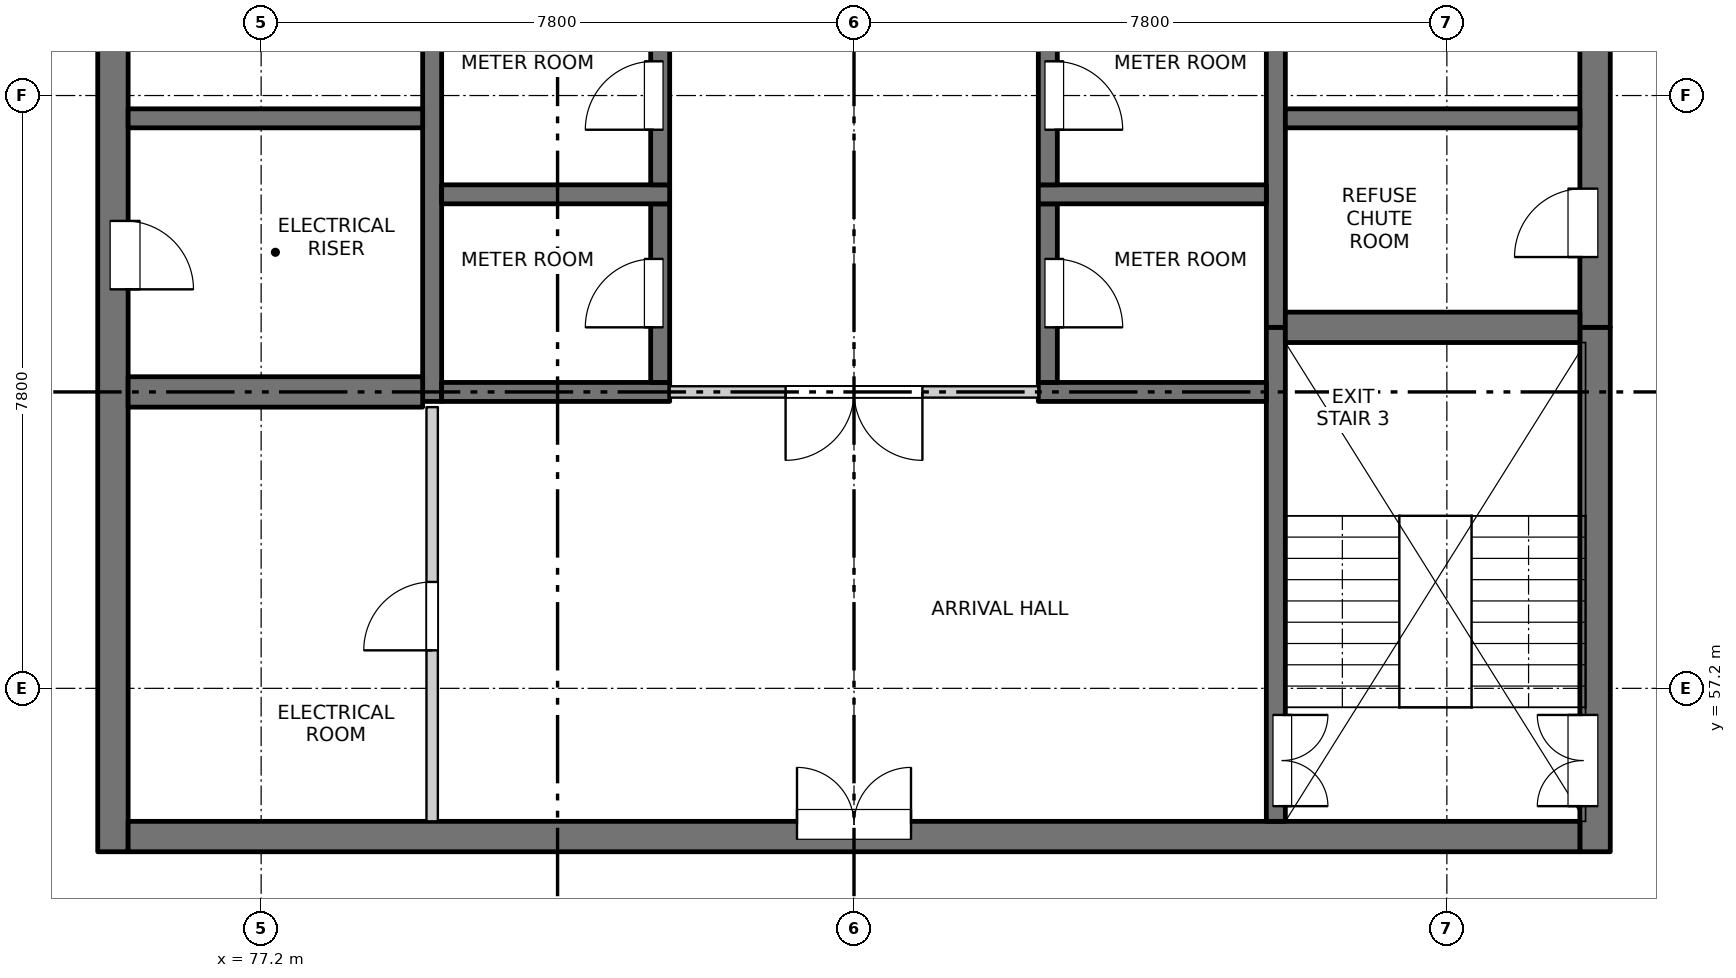
"""IFC4 building model, lengths in metres.
Left out: names, types, materials, properties, quantities, classifications, styles, units other than length and angle.
Written with IfcOpenShell. Run it as: python <this file> out.ifc"""

import sys

from ifc_helpers import new_model, si_unit, direction, frame, frame_2d, origin, place, context, subcontext, project, spatial, rectangle, extrude, element, fill, save


model = new_model("IFC4")
c1 = context("Model", 3, precision=1e-05, world=origin(), true_north=direction((0.0, 1.0)))
c2 = subcontext(c1, "Body", "Model", "MODEL_VIEW")
j1 = project(units=[si_unit("LENGTHUNIT", "METRE"), si_unit("PLANEANGLEUNIT", "RADIAN")], contexts=[c1])
p1 = place(None, origin())
s1 = spatial("IfcSite", under=j1, at=p1, CompositionType="ELEMENT")
p2 = place(p1, origin())
s2 = spatial("IfcBuilding", under=s1, at=p2, CompositionType="ELEMENT")
p3 = place(p2, frame((0.0, 0.0, 256.2)))
s3 = spatial("IfcBuildingStorey", under=s2, at=p3, CompositionType="ELEMENT", Elevation=256.2)
p4 = place(p3, frame((75.25, 55.05, -0.25), z_axis=(0.0, 0.0, 1.0), x_axis=(0.0, 1.0, 0.0)))
e1 = element("IfcWall", 1, at=p4, inside=s3, PredefinedType="SOLIDWALL", context=c2, shape_type="SweptSolid", body=[
    extrude(rectangle(XDim=22.25, YDim=0.4, at=frame_2d((11.125, 0.0))), origin(), (0.0, 0.0, 1.0), 3.4),
])
p5 = place(p4, frame((7.4, 0.0, 0.25)))
e2 = element("IfcOpeningElement", 2, at=p5, cuts=e1, PredefinedType="OPENING", context=c2, shape_type="SweptSolid", body=[
    extrude(rectangle(XDim=0.9, YDim=2.1, at=frame_2d((0.45, 1.05))), frame((0.0, 0.21, 0.0), z_axis=(0.0, -1.0, 0.0), x_axis=(1.0, 0.0, 0.0)), (0.0, 0.0, 1.0), 0.42),
])
p6 = place(p4, frame((10.7, 0.0, 0.25)))
e3 = element("IfcOpeningElement", 3, at=p6, cuts=e1, PredefinedType="OPENING", context=c2, shape_type="SweptSolid", body=[
    extrude(rectangle(XDim=0.9, YDim=2.1, at=frame_2d((0.45, 1.05))), frame((0.0, 0.21, 0.0), z_axis=(0.0, -1.0, 0.0), x_axis=(1.0, 0.0, 0.0)), (0.0, 0.0, 1.0), 0.42),
])
p7 = place(p4, frame((13.7, 0.0, 0.25)))
e4 = element("IfcOpeningElement", 4, at=p7, cuts=e1, PredefinedType="OPENING", context=c2, shape_type="SweptSolid", body=[
    extrude(rectangle(XDim=0.9, YDim=2.1, at=frame_2d((0.45, 1.05))), frame((0.0, 0.21, 0.0), z_axis=(0.0, -1.0, 0.0), x_axis=(1.0, 0.0, 0.0)), (0.0, 0.0, 1.0), 0.42),
])
p8 = place(p4, frame((16.7, 0.0, 0.25)))
e5 = element("IfcOpeningElement", 5, at=p8, cuts=e1, PredefinedType="OPENING", context=c2, shape_type="SweptSolid", body=[
    extrude(rectangle(XDim=0.9, YDim=2.1, at=frame_2d((0.45, 1.05))), frame((0.0, 0.21, 0.0), z_axis=(0.0, -1.0, 0.0), x_axis=(1.0, 0.0, 0.0)), (0.0, 0.0, 1.0), 0.42),
])
p9 = place(p4, frame((20.0, 0.0, 0.25)))
e6 = element("IfcOpeningElement", 6, at=p9, cuts=e1, PredefinedType="OPENING", context=c2, shape_type="SweptSolid", body=[
    extrude(rectangle(XDim=0.9, YDim=2.1, at=frame_2d((0.45, 1.05))), frame((0.0, 0.21, 0.0), z_axis=(0.0, -1.0, 0.0), x_axis=(1.0, 0.0, 0.0)), (0.0, 0.0, 1.0), 0.42),
])
p10 = place(p3, frame((94.75, 55.05, -0.25), z_axis=(0.0, 0.0, 1.0), x_axis=(0.0, 1.0, 0.0)))
e7 = element("IfcWall", 7, at=p10, inside=s3, PredefinedType="SOLIDWALL", context=c2, shape_type="SweptSolid", body=[
    extrude(rectangle(XDim=6.9, YDim=0.4, at=frame_2d((3.45, 0.0))), origin(), (0.0, 0.0, 1.0), 3.4),
])
p11 = place(p10, frame((0.6, 0.0, 0.25)))
e8 = element("IfcOpeningElement", 8, at=p11, cuts=e7, PredefinedType="OPENING", context=c2, shape_type="SweptSolid", body=[
    extrude(rectangle(XDim=1.2, YDim=2.1, at=frame_2d((0.6, 1.05))), frame((0.0, 0.21, 0.0), z_axis=(0.0, -1.0, 0.0), x_axis=(1.0, 0.0, 0.0)), (0.0, 0.0, 1.0), 0.42),
])
p12 = place(p3, frame((94.75, 61.95, -0.25), z_axis=(0.0, 0.0, 1.0), x_axis=(0.0, 1.0, 0.0)))
e9 = element("IfcWall", 9, at=p12, inside=s3, PredefinedType="SOLIDWALL", context=c2, shape_type="SweptSolid", body=[
    extrude(rectangle(XDim=15.35, YDim=0.4, at=frame_2d((7.675, 0.0))), origin(), (0.0, 0.0, 1.0), 3.4),
])
p13 = place(p12, frame((0.925, 0.0, 0.25)))
e10 = element("IfcOpeningElement", 10, at=p13, cuts=e9, PredefinedType="OPENING", context=c2, shape_type="SweptSolid", body=[
    extrude(rectangle(XDim=0.9, YDim=2.1, at=frame_2d((0.45, 1.05))), frame((0.0, 0.21, 0.0), z_axis=(0.0, -1.0, 0.0), x_axis=(1.0, 0.0, 0.0)), (0.0, 0.0, 1.0), 0.42),
])
p14 = place(p12, frame((3.8, 0.0, 0.25)))
e11 = element("IfcOpeningElement", 11, at=p14, cuts=e9, PredefinedType="OPENING", context=c2, shape_type="SweptSolid", body=[
    extrude(rectangle(XDim=0.9, YDim=2.1, at=frame_2d((0.45, 1.05))), frame((0.0, 0.21, 0.0), z_axis=(0.0, -1.0, 0.0), x_axis=(1.0, 0.0, 0.0)), (0.0, 0.0, 1.0), 0.42),
])
p15 = place(p12, frame((6.8, 0.0, 0.25)))
e12 = element("IfcOpeningElement", 12, at=p15, cuts=e9, PredefinedType="OPENING", context=c2, shape_type="SweptSolid", body=[
    extrude(rectangle(XDim=0.9, YDim=2.1, at=frame_2d((0.45, 1.05))), frame((0.0, 0.21, 0.0), z_axis=(0.0, -1.0, 0.0), x_axis=(1.0, 0.0, 0.0)), (0.0, 0.0, 1.0), 0.42),
])
p16 = place(p12, frame((9.8, 0.0, 0.25)))
e13 = element("IfcOpeningElement", 13, at=p16, cuts=e9, PredefinedType="OPENING", context=c2, shape_type="SweptSolid", body=[
    extrude(rectangle(XDim=0.9, YDim=2.1, at=frame_2d((0.45, 1.05))), frame((0.0, 0.21, 0.0), z_axis=(0.0, -1.0, 0.0), x_axis=(1.0, 0.0, 0.0)), (0.0, 0.0, 1.0), 0.42),
])
p17 = place(p12, frame((13.1, 0.0, 0.25)))
e14 = element("IfcOpeningElement", 14, at=p17, cuts=e9, PredefinedType="OPENING", context=c2, shape_type="SweptSolid", body=[
    extrude(rectangle(XDim=0.9, YDim=2.1, at=frame_2d((0.45, 1.05))), frame((0.0, 0.21, 0.0), z_axis=(0.0, -1.0, 0.0), x_axis=(1.0, 0.0, 0.0)), (0.0, 0.0, 1.0), 0.42),
])
p18 = place(p3, frame((75.45, 55.25, -0.25), z_axis=(0.0, 0.0, 1.0), x_axis=(1.0, 0.0, 0.0)))
e15 = element("IfcWall", 15, at=p18, inside=s3, PredefinedType="SOLIDWALL", context=c2, shape_type="SweptSolid", body=[
    extrude(rectangle(XDim=19.1, YDim=0.4, at=frame_2d((9.55, 0.0))), origin(), (0.0, 0.0, 1.0), 3.4),
])
p19 = place(p18, frame((8.8, 0.0, 0.25)))
e16 = element("IfcOpeningElement", 16, at=p19, cuts=e15, PredefinedType="OPENING", context=c2, shape_type="SweptSolid", body=[
    extrude(rectangle(XDim=1.5, YDim=2.1, at=frame_2d((0.75, 1.05))), frame((0.0, 0.21, 0.0), z_axis=(0.0, -1.0, 0.0), x_axis=(1.0, 0.0, 0.0)), (0.0, 0.0, 1.0), 0.42),
])
p20 = place(p3, frame((79.45, 60.975, -0.25), z_axis=(0.0, 0.0, 1.0), x_axis=(0.0, 1.0, 0.0)))
e17 = element("IfcWall", 17, at=p20, inside=s3, PredefinedType="SOLIDWALL", context=c2, shape_type="SweptSolid", body=[
    extrude(rectangle(XDim=16.325, YDim=0.25, at=frame_2d((8.163, 0.0))), origin(), (0.0, 0.0, 1.0), 3.4),
])
p21 = place(p3, frame((90.55, 55.45, -0.25), z_axis=(0.0, 0.0, 1.0), x_axis=(0.0, 1.0, 0.0)))
e18 = element("IfcWall", 18, at=p21, inside=s3, PredefinedType="SOLIDWALL", context=c2, shape_type="SweptSolid", body=[
    extrude(rectangle(XDim=6.5, YDim=0.25, at=frame_2d((3.25, 0.0))), origin(), (0.0, 0.0, 1.0), 3.4),
])
p22 = place(p21, frame((0.2, 0.0, 0.25)))
e19 = element("IfcOpeningElement", 19, at=p22, cuts=e18, PredefinedType="OPENING", context=c2, shape_type="SweptSolid", body=[
    extrude(rectangle(XDim=1.2, YDim=2.1, at=frame_2d((0.6, 1.05))), frame((0.0, 0.135, 0.0), z_axis=(0.0, -1.0, 0.0), x_axis=(1.0, 0.0, 0.0)), (0.0, 0.0, 1.0), 0.27),
])
p23 = place(p3, frame((90.55, 61.95, -0.25), z_axis=(0.0, 0.0, 1.0), x_axis=(0.0, 1.0, 0.0)))
e20 = element("IfcWall", 20, at=p23, inside=s3, PredefinedType="SOLIDWALL", context=c2, shape_type="SweptSolid", body=[
    extrude(rectangle(XDim=15.35, YDim=0.25, at=frame_2d((7.675, 0.0))), origin(), (0.0, 0.0, 1.0), 3.4),
])
p24 = place(p3, frame((79.575, 61.1, -0.25), z_axis=(0.0, 0.0, 1.0), x_axis=(1.0, 0.0, 0.0)))
e21 = element("IfcWall", 21, at=p24, inside=s3, PredefinedType="SOLIDWALL", context=c2, shape_type="SweptSolid", body=[
    extrude(rectangle(XDim=3.0, YDim=0.25, at=frame_2d((1.5, 0.0))), origin(), (0.0, 0.0, 1.0), 3.4),
])
p25 = place(p3, frame((82.45, 61.225, -0.25), z_axis=(0.0, 0.0, 1.0), x_axis=(0.0, 1.0, 0.0)))
e22 = element("IfcWall", 22, at=p25, inside=s3, PredefinedType="SOLIDWALL", context=c2, shape_type="SweptSolid", body=[
    extrude(rectangle(XDim=2.35, YDim=0.25, at=frame_2d((1.175, 0.0))), origin(), (0.0, 0.0, 1.0), 3.4),
])
p26 = place(p25, frame((0.725, 0.0, 0.25)))
e23 = element("IfcOpeningElement", 23, at=p26, cuts=e22, PredefinedType="OPENING", context=c2, shape_type="SweptSolid", body=[
    extrude(rectangle(XDim=0.9, YDim=2.1, at=frame_2d((0.45, 1.05))), frame((0.0, 0.135, 0.0), z_axis=(0.0, -1.0, 0.0), x_axis=(1.0, 0.0, 0.0)), (0.0, 0.0, 1.0), 0.27),
])
p27 = place(p3, frame((79.575, 63.7, -0.25), z_axis=(0.0, 0.0, 1.0), x_axis=(1.0, 0.0, 0.0)))
e24 = element("IfcWall", 24, at=p27, inside=s3, PredefinedType="SOLIDWALL", context=c2, shape_type="SweptSolid", body=[
    extrude(rectangle(XDim=3.0, YDim=0.25, at=frame_2d((1.5, 0.0))), origin(), (0.0, 0.0, 1.0), 3.4),
])
p28 = place(p3, frame((82.45, 63.825, -0.25), z_axis=(0.0, 0.0, 1.0), x_axis=(0.0, 1.0, 0.0)))
e25 = element("IfcWall", 25, at=p28, inside=s3, PredefinedType="SOLIDWALL", context=c2, shape_type="SweptSolid", body=[
    extrude(rectangle(XDim=2.35, YDim=0.25, at=frame_2d((1.175, 0.0))), origin(), (0.0, 0.0, 1.0), 3.4),
])
p29 = place(p28, frame((0.725, 0.0, 0.25)))
e26 = element("IfcOpeningElement", 26, at=p29, cuts=e25, PredefinedType="OPENING", context=c2, shape_type="SweptSolid", body=[
    extrude(rectangle(XDim=0.9, YDim=2.1, at=frame_2d((0.45, 1.05))), frame((0.0, 0.135, 0.0), z_axis=(0.0, -1.0, 0.0), x_axis=(1.0, 0.0, 0.0)), (0.0, 0.0, 1.0), 0.27),
])
p30 = place(p3, frame((87.425, 61.1, -0.25), z_axis=(0.0, 0.0, 1.0), x_axis=(1.0, 0.0, 0.0)))
e27 = element("IfcWall", 27, at=p30, inside=s3, PredefinedType="SOLIDWALL", context=c2, shape_type="SweptSolid", body=[
    extrude(rectangle(XDim=3.0, YDim=0.25, at=frame_2d((1.5, 0.0))), origin(), (0.0, 0.0, 1.0), 3.4),
])
p31 = place(p3, frame((87.55, 61.225, -0.25), z_axis=(0.0, 0.0, 1.0), x_axis=(0.0, 1.0, 0.0)))
e28 = element("IfcWall", 28, at=p31, inside=s3, PredefinedType="SOLIDWALL", context=c2, shape_type="SweptSolid", body=[
    extrude(rectangle(XDim=2.35, YDim=0.25, at=frame_2d((1.175, 0.0))), origin(), (0.0, 0.0, 1.0), 3.4),
])
p32 = place(p31, frame((0.725, 0.0, 0.25)))
e29 = element("IfcOpeningElement", 29, at=p32, cuts=e28, PredefinedType="OPENING", context=c2, shape_type="SweptSolid", body=[
    extrude(rectangle(XDim=0.9, YDim=2.1, at=frame_2d((0.45, 1.05))), frame((0.0, 0.135, 0.0), z_axis=(0.0, -1.0, 0.0), x_axis=(1.0, 0.0, 0.0)), (0.0, 0.0, 1.0), 0.27),
])
p33 = place(p3, frame((87.425, 63.7, -0.25), z_axis=(0.0, 0.0, 1.0), x_axis=(1.0, 0.0, 0.0)))
e30 = element("IfcWall", 30, at=p33, inside=s3, PredefinedType="SOLIDWALL", context=c2, shape_type="SweptSolid", body=[
    extrude(rectangle(XDim=3.0, YDim=0.25, at=frame_2d((1.5, 0.0))), origin(), (0.0, 0.0, 1.0), 3.4),
])
p34 = place(p3, frame((87.55, 63.825, -0.25), z_axis=(0.0, 0.0, 1.0), x_axis=(0.0, 1.0, 0.0)))
e31 = element("IfcWall", 31, at=p34, inside=s3, PredefinedType="SOLIDWALL", context=c2, shape_type="SweptSolid", body=[
    extrude(rectangle(XDim=2.35, YDim=0.25, at=frame_2d((1.175, 0.0))), origin(), (0.0, 0.0, 1.0), 3.4),
])
p35 = place(p34, frame((0.725, 0.0, 0.25)))
e32 = element("IfcOpeningElement", 32, at=p35, cuts=e31, PredefinedType="OPENING", context=c2, shape_type="SweptSolid", body=[
    extrude(rectangle(XDim=0.9, YDim=2.1, at=frame_2d((0.45, 1.05))), frame((0.0, 0.135, 0.0), z_axis=(0.0, -1.0, 0.0), x_axis=(1.0, 0.0, 0.0)), (0.0, 0.0, 1.0), 0.27),
])
p36 = place(p3, frame((75.45, 61.1, -0.25), z_axis=(0.0, 0.0, 1.0), x_axis=(1.0, 0.0, 0.0)))
e33 = element("IfcWall", 33, at=p36, inside=s3, PredefinedType="SOLIDWALL", context=c2, shape_type="SweptSolid", body=[
    extrude(rectangle(XDim=3.875, YDim=0.4, at=frame_2d((1.938, 0.0))), origin(), (0.0, 0.0, 1.0), 3.4),
])
p37 = place(p3, frame((75.45, 64.7, -0.25), z_axis=(0.0, 0.0, 1.0), x_axis=(1.0, 0.0, 0.0)))
e34 = element("IfcWall", 34, at=p37, inside=s3, PredefinedType="SOLIDWALL", context=c2, shape_type="SweptSolid", body=[
    extrude(rectangle(XDim=3.875, YDim=0.25, at=frame_2d((1.938, 0.0))), origin(), (0.0, 0.0, 1.0), 3.4),
])
p38 = place(p3, frame((90.675, 61.95, -0.25), z_axis=(0.0, 0.0, 1.0), x_axis=(1.0, 0.0, 0.0)))
e35 = element("IfcWall", 35, at=p38, inside=s3, PredefinedType="SOLIDWALL", context=c2, shape_type="SweptSolid", body=[
    extrude(rectangle(XDim=3.875, YDim=0.4, at=frame_2d((1.938, 0.0))), origin(), (0.0, 0.0, 1.0), 3.4),
])
p39 = place(p3, frame((90.675, 64.7, -0.25), z_axis=(0.0, 0.0, 1.0), x_axis=(1.0, 0.0, 0.0)))
e36 = element("IfcWall", 36, at=p39, inside=s3, PredefinedType="SOLIDWALL", context=c2, shape_type="SweptSolid", body=[
    extrude(rectangle(XDim=3.875, YDim=0.25, at=frame_2d((1.938, 0.0))), origin(), (0.0, 0.0, 1.0), 3.4),
])
p40 = place(p3, frame((82.575, 61.1, 0.0), z_axis=(0.0, 0.0, 1.0), x_axis=(1.0, 0.0, 0.0)))
e37 = element("IfcWall", 37, at=p40, inside=s3, PredefinedType="PARTITIONING", context=c2, shape_type="SweptSolid", body=[
    extrude(rectangle(XDim=4.85, YDim=0.15, at=frame_2d((2.425, 0.0))), origin(), (0.0, 0.0, 1.0), 3.15),
])
p41 = place(p40, frame((1.525, 0.0, 0.0)))
e38 = element("IfcOpeningElement", 38, at=p41, cuts=e37, PredefinedType="OPENING", context=c2, shape_type="SweptSolid", body=[
    extrude(rectangle(XDim=1.8, YDim=2.1, at=frame_2d((0.9, 1.05))), frame((0.0, 0.085, 0.0), z_axis=(0.0, -1.0, 0.0), x_axis=(1.0, 0.0, 0.0)), (0.0, 0.0, 1.0), 0.17),
])
p42 = place(p3, frame((79.45, 55.45, 0.0), z_axis=(0.0, 0.0, 1.0), x_axis=(0.0, 1.0, 0.0)))
e39 = element("IfcWall", 39, at=p42, inside=s3, PredefinedType="PARTITIONING", context=c2, shape_type="SweptSolid", body=[
    extrude(rectangle(XDim=5.45, YDim=0.15, at=frame_2d((2.725, 0.0))), origin(), (0.0, 0.0, 1.0), 3.15),
])
p43 = place(p42, frame((2.25, 0.0, 0.0)))
e40 = element("IfcOpeningElement", 40, at=p43, cuts=e39, PredefinedType="OPENING", context=c2, shape_type="SweptSolid", body=[
    extrude(rectangle(XDim=0.9, YDim=2.1, at=frame_2d((0.45, 1.05))), frame((0.0, 0.085, 0.0), z_axis=(0.0, -1.0, 0.0), x_axis=(1.0, 0.0, 0.0)), (0.0, 0.0, 1.0), 0.17),
])
p44 = place(p19, origin())
e41 = element("IfcDoor", 41, at=p44, inside=s3, OperationType="DOUBLE_DOOR_SINGLE_SWING", PredefinedType="DOOR", context=c2, shape_type="SweptSolid", body=[
    extrude(rectangle(XDim=1.5, YDim=2.1, at=frame_2d((0.75, 1.05))), frame((0.0, 0.185, 0.0), z_axis=(0.0, -1.0, 0.0), x_axis=(1.0, 0.0, 0.0)), (0.0, 0.0, 1.0), 0.05),
])
fill(e16, e41)
p45 = place(p22, origin())
e42 = element("IfcDoor", 42, at=p45, inside=s3, OperationType="DOUBLE_DOOR_SINGLE_SWING", PredefinedType="DOOR", context=c2, shape_type="SweptSolid", body=[
    extrude(rectangle(XDim=1.2, YDim=2.1, at=frame_2d((0.6, 1.05))), frame((0.0, -0.06, 0.0), z_axis=(0.0, -1.0, 0.0), x_axis=(1.0, 0.0, 0.0)), (0.0, 0.0, 1.0), 0.05),
])
fill(e19, e42)
p46 = place(p11, origin())
e43 = element("IfcDoor", 43, at=p46, inside=s3, OperationType="DOUBLE_DOOR_SINGLE_SWING", PredefinedType="DOOR", context=c2, shape_type="SweptSolid", body=[
    extrude(rectangle(XDim=1.2, YDim=2.1, at=frame_2d((0.6, 1.05))), frame((0.0, 0.185, 0.0), z_axis=(0.0, -1.0, 0.0), x_axis=(1.0, 0.0, 0.0)), (0.0, 0.0, 1.0), 0.05),
])
fill(e8, e43)
p47 = place(p43, origin())
e44 = element("IfcDoor", 44, at=p47, inside=s3, OperationType="SINGLE_SWING_LEFT", PredefinedType="DOOR", context=c2, shape_type="SweptSolid", body=[
    extrude(rectangle(XDim=0.9, YDim=2.1, at=frame_2d((0.45, 1.05))), frame((0.0, 0.025, 0.0), z_axis=(0.0, -1.0, 0.0), x_axis=(1.0, 0.0, 0.0)), (0.0, 0.0, 1.0), 0.05),
])
fill(e40, e44)
p48 = place(p41, origin())
e45 = element("IfcDoor", 45, at=p48, inside=s3, OperationType="DOUBLE_DOOR_SINGLE_SWING", PredefinedType="DOOR", context=c2, shape_type="SweptSolid", body=[
    extrude(rectangle(XDim=1.8, YDim=2.1, at=frame_2d((0.9, 1.05))), frame((0.0, 0.025, 0.0), z_axis=(0.0, -1.0, 0.0), x_axis=(1.0, 0.0, 0.0)), (0.0, 0.0, 1.0), 0.05),
])
fill(e38, e45)
p49 = place(p26, origin())
e46 = element("IfcDoor", 46, at=p49, inside=s3, OperationType="SINGLE_SWING_LEFT", PredefinedType="DOOR", context=c2, shape_type="SweptSolid", body=[
    extrude(rectangle(XDim=0.9, YDim=2.1, at=frame_2d((0.45, 1.05))), frame((0.0, 0.11, 0.0), z_axis=(0.0, -1.0, 0.0), x_axis=(1.0, 0.0, 0.0)), (0.0, 0.0, 1.0), 0.05),
])
fill(e23, e46)
p50 = place(p32, origin())
e47 = element("IfcDoor", 47, at=p50, inside=s3, OperationType="SINGLE_SWING_RIGHT", PredefinedType="DOOR", context=c2, shape_type="SweptSolid", body=[
    extrude(rectangle(XDim=0.9, YDim=2.1, at=frame_2d((0.45, 1.05))), frame((0.0, -0.06, 0.0), z_axis=(0.0, -1.0, 0.0), x_axis=(1.0, 0.0, 0.0)), (0.0, 0.0, 1.0), 0.05),
])
fill(e29, e47)
p51 = place(p5, origin())
e48 = element("IfcDoor", 48, at=p51, inside=s3, OperationType="SINGLE_SWING_RIGHT", PredefinedType="DOOR", context=c2, shape_type="SweptSolid", body=[
    extrude(rectangle(XDim=0.9, YDim=2.1, at=frame_2d((0.45, 1.05))), frame((0.0, -0.135, 0.0), z_axis=(0.0, -1.0, 0.0), x_axis=(1.0, 0.0, 0.0)), (0.0, 0.0, 1.0), 0.05),
])
fill(e2, e48)
p52 = place(p13, origin())
e49 = element("IfcDoor", 49, at=p52, inside=s3, OperationType="SINGLE_SWING_LEFT", PredefinedType="DOOR", context=c2, shape_type="SweptSolid", body=[
    extrude(rectangle(XDim=0.9, YDim=2.1, at=frame_2d((0.45, 1.05))), frame((0.0, 0.185, 0.0), z_axis=(0.0, -1.0, 0.0), x_axis=(1.0, 0.0, 0.0)), (0.0, 0.0, 1.0), 0.05),
])
fill(e10, e49)
p53 = place(p29, origin())
e50 = element("IfcDoor", 50, at=p53, inside=s3, OperationType="SINGLE_SWING_LEFT", PredefinedType="DOOR", context=c2, shape_type="SweptSolid", body=[
    extrude(rectangle(XDim=0.9, YDim=2.1, at=frame_2d((0.45, 1.05))), frame((0.0, 0.11, 0.0), z_axis=(0.0, -1.0, 0.0), x_axis=(1.0, 0.0, 0.0)), (0.0, 0.0, 1.0), 0.05),
])
fill(e26, e50)
p54 = place(p35, origin())
e51 = element("IfcDoor", 51, at=p54, inside=s3, OperationType="SINGLE_SWING_RIGHT", PredefinedType="DOOR", context=c2, shape_type="SweptSolid", body=[
    extrude(rectangle(XDim=0.9, YDim=2.1, at=frame_2d((0.45, 1.05))), frame((0.0, -0.06, 0.0), z_axis=(0.0, -1.0, 0.0), x_axis=(1.0, 0.0, 0.0)), (0.0, 0.0, 1.0), 0.05),
])
fill(e32, e51)
save(model, sys.argv[1])
